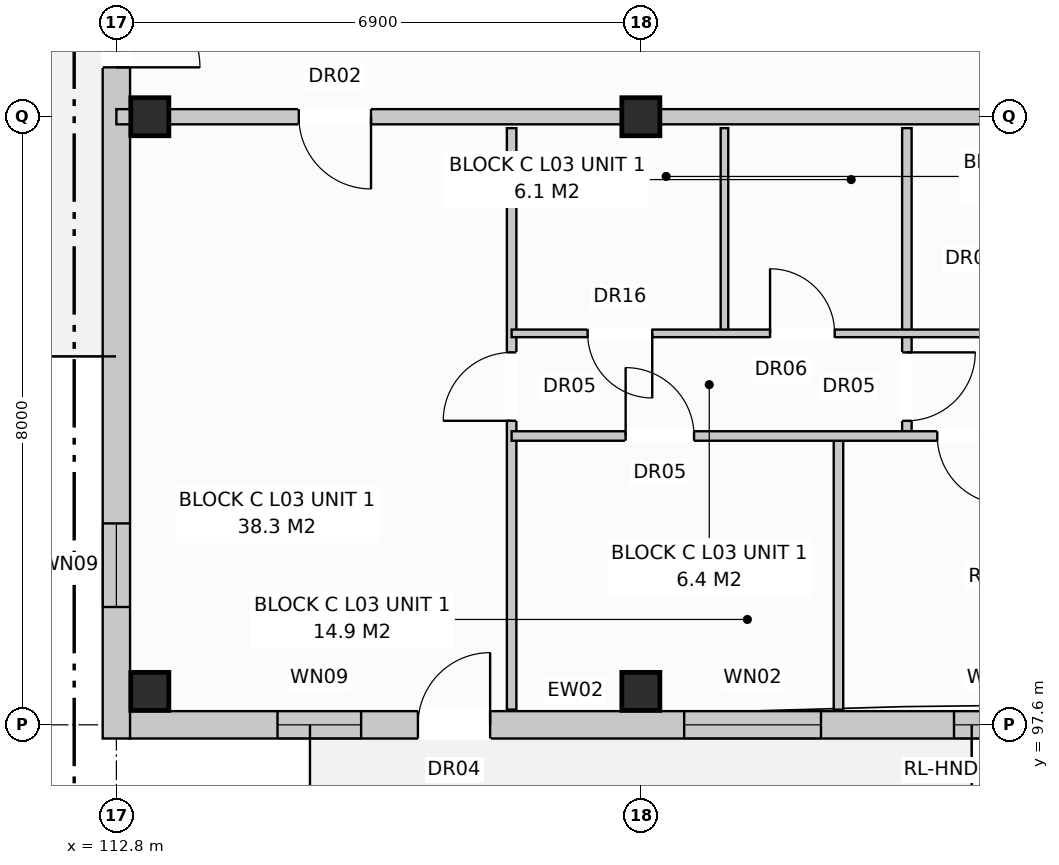
"""IFC4 building model, lengths in metres.
Left out: names, types, materials, properties, quantities, classifications, styles, units other than length and angle.
Written with IfcOpenShell. Run it as: python <this file> out.ifc"""

import sys

from ifc_helpers import new_model, si_unit, direction, frame, frame_2d, origin, origin_with_axes, origin_2d, place, context, subcontext, project, spatial, rectangle, extrude, element, fill, save


model = new_model("IFC4")
c1 = context("Model", 3, precision=1e-05, world=origin(), true_north=direction((0.0, 1.0)))
c2 = subcontext(c1, "Body", "Model", "MODEL_VIEW")
j1 = project(units=[si_unit("LENGTHUNIT", "METRE"), si_unit("PLANEANGLEUNIT", "RADIAN")], contexts=[c1])
p1 = place(None, origin())
s1 = spatial("IfcSite", under=j1, at=p1, CompositionType="ELEMENT")
p2 = place(p1, origin())
s2 = spatial("IfcBuilding", under=s1, at=p2, CompositionType="ELEMENT")
p3 = place(p2, frame((0.0, 0.0, 11.2)))
s3 = spatial("IfcBuildingStorey", under=s2, at=p3, CompositionType="ELEMENT", Elevation=11.2)
for number, where, z_axis, x_axis in (
    (1, (113.24, 98.04, 0.0), (0.0, 0.0, 1.0), (1.0, 0.0, 0.0)),
    (2, (113.24, 105.6, 0.0), (0.0, 0.0, 1.0), (1.0, 0.0, 0.0)),
    (3, (119.7, 98.04, 0.0), (0.0, 0.0, 1.0), (1.0, 0.0, 0.0)),
    (4, (119.7, 105.6, 0.0), (0.0, 0.0, 1.0), (1.0, 0.0, 0.0)),
):
    element("IfcColumn", number, at=place(p3, frame(where, z_axis=z_axis, x_axis=x_axis)), inside=s3, PredefinedType="COLUMN", context=c2, shape_type="SweptSolid", body=[
        extrude(rectangle(XDim=0.5, YDim=0.5, at=origin_2d()), origin(), (0.0, 0.0, 1.0), 3.2),
    ])
p4 = place(p3, frame((112.97, 97.6, 0.0), z_axis=(0.0, 0.0, 1.0), x_axis=(1.0, 0.0, 0.0)))
e5 = element("IfcWall", 5, at=p4, inside=s3, PredefinedType="STANDARD", context=c2, shape_type="SweptSolid", body=[
    extrude(rectangle(XDim=14.08, YDim=0.36, at=frame_2d((7.04, 0.0))), origin(), (0.0, 0.0, 1.0), 2.94),
])
p5 = place(p4, frame((3.797, 0.0, 0.0)))
e6 = element("IfcOpeningElement", 6, at=p5, cuts=e5, PredefinedType="OPENING", context=c2, shape_type="SweptSolid", body=[
    extrude(rectangle(XDim=0.95, YDim=2.1, at=frame_2d((0.475, 1.05))), frame((0.0, 0.192, 0.0), z_axis=(0.0, -1.0, 0.0), x_axis=(1.0, 0.0, 0.0)), (0.0, 0.0, 1.0), 0.384),
])
p6 = place(p4, frame((1.95, 0.0, 0.72)))
e7 = element("IfcOpeningElement", 7, at=p6, cuts=e5, PredefinedType="OPENING", context=c2, shape_type="SweptSolid", body=[
    extrude(rectangle(XDim=1.1, YDim=1.5, at=frame_2d((0.55, 0.75))), frame((0.0, 0.192, 0.0), z_axis=(0.0, -1.0, 0.0), x_axis=(1.0, 0.0, 0.0)), (0.0, 0.0, 1.0), 0.384),
])
p7 = place(p4, frame((7.3, 0.0, 0.8)))
e8 = element("IfcOpeningElement", 8, at=p7, cuts=e5, PredefinedType="OPENING", context=c2, shape_type="SweptSolid", body=[
    extrude(rectangle(XDim=1.8, YDim=1.7, at=frame_2d((0.9, 0.85))), frame((0.0, 0.192, 0.0), z_axis=(0.0, -1.0, 0.0), x_axis=(1.0, 0.0, 0.0)), (0.0, 0.0, 1.0), 0.384),
])
p8 = place(p4, frame((10.85, 0.0, 0.72)))
e9 = element("IfcOpeningElement", 9, at=p8, cuts=e5, PredefinedType="OPENING", context=c2, shape_type="SweptSolid", body=[
    extrude(rectangle(XDim=1.1, YDim=1.5, at=frame_2d((0.55, 0.75))), frame((0.0, 0.192, 0.0), z_axis=(0.0, -1.0, 0.0), x_axis=(1.0, 0.0, 0.0)), (0.0, 0.0, 1.0), 0.384),
])
p9 = place(p3, frame((112.8, 97.42, 0.0), z_axis=(0.0, 0.0, 1.0), x_axis=(0.0, 1.0, 0.0)))
e10 = element("IfcWall", 10, at=p9, inside=s3, PredefinedType="STANDARD", context=c2, shape_type="SweptSolid", body=[
    extrude(rectangle(XDim=18.76, YDim=0.36, at=frame_2d((9.38, 0.0))), origin(), (0.0, 0.0, 1.0), 2.94),
])
p10 = place(p9, frame((8.83, 0.0, 0.0)))
e11 = element("IfcOpeningElement", 11, at=p10, cuts=e10, PredefinedType="OPENING", context=c2, shape_type="SweptSolid", body=[
    extrude(rectangle(XDim=1.1, YDim=2.1, at=frame_2d((0.55, 1.05))), frame((0.0, 0.192, 0.0), z_axis=(0.0, -1.0, 0.0), x_axis=(1.0, 0.0, 0.0)), (0.0, 0.0, 1.0), 0.384),
])
p11 = place(p9, frame((1.73, 0.0, 0.72)))
e12 = element("IfcOpeningElement", 12, at=p11, cuts=e10, PredefinedType="OPENING", context=c2, shape_type="SweptSolid", body=[
    extrude(rectangle(XDim=1.1, YDim=1.5, at=frame_2d((0.55, 0.75))), frame((0.0, 0.192, 0.0), z_axis=(0.0, -1.0, 0.0), x_axis=(1.0, 0.0, 0.0)), (0.0, 0.0, 1.0), 0.384),
])
p12 = place(p9, frame((15.93, 0.0, 0.72)))
e13 = element("IfcOpeningElement", 13, at=p12, cuts=e10, PredefinedType="OPENING", context=c2, shape_type="SweptSolid", body=[
    extrude(rectangle(XDim=1.1, YDim=1.5, at=frame_2d((0.55, 0.75))), frame((0.0, 0.192, 0.0), z_axis=(0.0, -1.0, 0.0), x_axis=(1.0, 0.0, 0.0)), (0.0, 0.0, 1.0), 0.384),
])
p13 = place(p3, frame((112.8, 105.6, 0.0), z_axis=(0.0, 0.0, 1.0), x_axis=(1.0, 0.0, 0.0)))
e14 = element("IfcWall", 14, at=p13, inside=s3, PredefinedType="PARTITIONING", context=c2, shape_type="SweptSolid", body=[
    extrude(rectangle(XDim=13.8, YDim=0.2, at=frame_2d((6.9, 0.0))), origin(), (0.0, 0.0, 1.0), 2.38),
])
p14 = place(p13, frame((2.4, 0.0, 0.0)))
e15 = element("IfcOpeningElement", 15, at=p14, cuts=e14, PredefinedType="OPENING", context=c2, shape_type="SweptSolid", body=[
    extrude(rectangle(XDim=0.95, YDim=2.15, at=frame_2d((0.475, 1.075))), frame((0.0, 0.112, 0.0), z_axis=(0.0, -1.0, 0.0), x_axis=(1.0, 0.0, 0.0)), (0.0, 0.0, 1.0), 0.224),
])
p15 = place(p3, frame((118.0, 105.45, 0.0), z_axis=(0.0, 0.0, 1.0), x_axis=(0.0, -1.0, 0.0)))
e16 = element("IfcWall", 16, at=p15, inside=s3, PredefinedType="PARTITIONING", context=c2, shape_type="SweptSolid", body=[
    extrude(rectangle(XDim=7.65, YDim=0.125, at=frame_2d((3.825, 0.0))), origin(), (0.0, 0.0, 1.0), 2.94),
])
p16 = place(p15, frame((2.95, 0.0, 0.0)))
e17 = element("IfcOpeningElement", 17, at=p16, cuts=e16, PredefinedType="OPENING", context=c2, shape_type="SweptSolid", body=[
    extrude(rectangle(XDim=0.9, YDim=2.1, at=frame_2d((0.45, 1.05))), frame((0.0, 0.074, 0.0), z_axis=(0.0, -1.0, 0.0), x_axis=(1.0, 0.0, 0.0)), (0.0, 0.0, 1.0), 0.149),
])
p17 = place(p3, frame((120.8, 105.45, 0.0), z_axis=(0.0, 0.0, 1.0), x_axis=(0.0, -1.0, 0.0)))
e18 = element("IfcWall", 18, at=p17, inside=s3, PredefinedType="PARTITIONING", context=c2, shape_type="SweptSolid", body=[
    extrude(rectangle(XDim=2.7, YDim=0.1, at=frame_2d((1.35, 0.0))), origin(), (0.0, 0.0, 1.0), 2.94),
])
p18 = place(p3, frame((123.2, 105.45, 0.0), z_axis=(0.0, 0.0, 1.0), x_axis=(0.0, -1.0, 0.0)))
e19 = element("IfcWall", 19, at=p18, inside=s3, PredefinedType="PARTITIONING", context=c2, shape_type="SweptSolid", body=[
    extrude(rectangle(XDim=4.05, YDim=0.125, at=frame_2d((2.025, 0.0))), origin(), (0.0, 0.0, 1.0), 2.59),
])
p19 = place(p18, frame((2.95, 0.0, 0.0)))
e20 = element("IfcOpeningElement", 20, at=p19, cuts=e19, PredefinedType="OPENING", context=c2, shape_type="SweptSolid", body=[
    extrude(rectangle(XDim=0.9, YDim=2.1, at=frame_2d((0.45, 1.05))), frame((0.0, 0.074, 0.0), z_axis=(0.0, -1.0, 0.0), x_axis=(1.0, 0.0, 0.0)), (0.0, 0.0, 1.0), 0.149),
])
p20 = place(p3, frame((122.3, 101.4, 0.0), z_axis=(0.0, 0.0, 1.0), x_axis=(0.0, -1.0, 0.0)))
e21 = element("IfcWall", 21, at=p20, inside=s3, PredefinedType="PARTITIONING", context=c2, shape_type="SweptSolid", body=[
    extrude(rectangle(XDim=3.6, YDim=0.125, at=frame_2d((1.8, 0.0))), origin(), (0.0, 0.0, 1.0), 2.94),
])
p21 = place(p3, frame((118.0, 102.75, 0.0), z_axis=(0.0, 0.0, 1.0), x_axis=(1.0, 0.0, 0.0)))
e22 = element("IfcWall", 22, at=p21, inside=s3, PredefinedType="PARTITIONING", context=c2, shape_type="SweptSolid", body=[
    extrude(rectangle(XDim=8.5, YDim=0.1, at=frame_2d((4.25, 0.0))), origin(), (0.0, 0.0, 1.0), 2.94),
])
p22 = place(p21, frame((1.0, 0.0, 0.0)))
e23 = element("IfcOpeningElement", 23, at=p22, cuts=e22, PredefinedType="OPENING", context=c2, shape_type="SweptSolid", body=[
    extrude(rectangle(XDim=0.85, YDim=2.1, at=frame_2d((0.425, 1.05))), frame((0.0, 0.062, 0.0), z_axis=(0.0, -1.0, 0.0), x_axis=(1.0, 0.0, 0.0)), (0.0, 0.0, 1.0), 0.124),
])
p23 = place(p21, frame((3.4, 0.0, 0.0)))
e24 = element("IfcOpeningElement", 24, at=p23, cuts=e22, PredefinedType="OPENING", context=c2, shape_type="SweptSolid", body=[
    extrude(rectangle(XDim=0.85, YDim=2.05, at=frame_2d((0.425, 1.025))), frame((0.0, 0.062, 0.0), z_axis=(0.0, -1.0, 0.0), x_axis=(1.0, 0.0, 0.0)), (0.0, 0.0, 1.0), 0.124),
])
p24 = place(p21, frame((6.2, 0.0, 0.0)))
e25 = element("IfcOpeningElement", 25, at=p24, cuts=e22, PredefinedType="OPENING", context=c2, shape_type="SweptSolid", body=[
    extrude(rectangle(XDim=0.85, YDim=2.05, at=frame_2d((0.425, 1.025))), frame((0.0, 0.062, 0.0), z_axis=(0.0, -1.0, 0.0), x_axis=(1.0, 0.0, 0.0)), (0.0, 0.0, 1.0), 0.124),
])
p25 = place(p3, frame((118.0, 101.4, 0.0), z_axis=(0.0, 0.0, 1.0), x_axis=(1.0, 0.0, 0.0)))
e26 = element("IfcWall", 26, at=p25, inside=s3, PredefinedType="PARTITIONING", context=c2, shape_type="SweptSolid", body=[
    extrude(rectangle(XDim=8.5, YDim=0.125, at=frame_2d((4.25, 0.0))), origin(), (0.0, 0.0, 1.0), 2.94),
])
p26 = place(p25, frame((1.5, 0.0, 0.0)))
e27 = element("IfcOpeningElement", 27, at=p26, cuts=e26, PredefinedType="OPENING", context=c2, shape_type="SweptSolid", body=[
    extrude(rectangle(XDim=0.9, YDim=2.1, at=frame_2d((0.45, 1.05))), frame((0.0, 0.074, 0.0), z_axis=(0.0, -1.0, 0.0), x_axis=(1.0, 0.0, 0.0)), (0.0, 0.0, 1.0), 0.149),
])
p27 = place(p25, frame((5.6, 0.0, 0.0)))
e28 = element("IfcOpeningElement", 28, at=p27, cuts=e26, PredefinedType="OPENING", context=c2, shape_type="SweptSolid", body=[
    extrude(rectangle(XDim=0.9, YDim=2.1, at=frame_2d((0.45, 1.05))), frame((0.0, 0.074, 0.0), z_axis=(0.0, -1.0, 0.0), x_axis=(1.0, 0.0, 0.0)), (0.0, 0.0, 1.0), 0.149),
])
p28 = place(p5, origin_with_axes())
e29 = element("IfcDoor", 29, at=p28, inside=s3, OperationType="SINGLE_SWING_RIGHT", PredefinedType="DOOR", context=c2, shape_type="SweptSolid", body=[
    extrude(rectangle(XDim=0.95, YDim=2.1, at=frame_2d((0.475, 1.05))), frame((0.0, 0.025, 0.0), z_axis=(0.0, -1.0, 0.0), x_axis=(1.0, 0.0, 0.0)), (0.0, 0.0, 1.0), 0.05),
])
fill(e6, e29)
p29 = place(p6, origin_with_axes())
e30 = element("IfcWindow", 30, at=p29, inside=s3, PartitioningType="SINGLE_PANEL", PredefinedType="WINDOW", context=c2, shape_type="SweptSolid", body=[
    extrude(rectangle(XDim=1.1, YDim=1.5, at=frame_2d((0.55, 0.75))), frame((0.0, 0.03, 0.0), z_axis=(0.0, -1.0, 0.0), x_axis=(1.0, 0.0, 0.0)), (0.0, 0.0, 1.0), 0.06),
])
fill(e7, e30)
p30 = place(p7, origin_with_axes())
e31 = element("IfcWindow", 31, at=p30, inside=s3, PartitioningType="SINGLE_PANEL", PredefinedType="WINDOW", context=c2, shape_type="SweptSolid", body=[
    extrude(rectangle(XDim=1.8, YDim=1.7, at=frame_2d((0.9, 0.85))), frame((0.0, 0.03, 0.0), z_axis=(0.0, -1.0, 0.0), x_axis=(1.0, 0.0, 0.0)), (0.0, 0.0, 1.0), 0.06),
])
fill(e8, e31)
p31 = place(p8, origin_with_axes())
e32 = element("IfcWindow", 32, at=p31, inside=s3, PartitioningType="SINGLE_PANEL", PredefinedType="WINDOW", context=c2, shape_type="SweptSolid", body=[
    extrude(rectangle(XDim=1.1, YDim=1.5, at=frame_2d((0.55, 0.75))), frame((0.0, 0.03, 0.0), z_axis=(0.0, -1.0, 0.0), x_axis=(1.0, 0.0, 0.0)), (0.0, 0.0, 1.0), 0.06),
])
fill(e9, e32)
p32 = place(p10, frame((1.1, 0.0, 0.0), z_axis=(0.0, 0.0, 1.0), x_axis=(-1.0, 0.0, 0.0)))
e33 = element("IfcDoor", 33, at=p32, inside=s3, OperationType="SINGLE_SWING_LEFT", PredefinedType="DOOR", context=c2, shape_type="SweptSolid", body=[
    extrude(rectangle(XDim=1.1, YDim=2.1, at=frame_2d((0.55, 1.05))), frame((0.0, 0.025, 0.0), z_axis=(0.0, -1.0, 0.0), x_axis=(1.0, 0.0, 0.0)), (0.0, 0.0, 1.0), 0.05),
])
fill(e11, e33)
p33 = place(p11, origin_with_axes())
e34 = element("IfcWindow", 34, at=p33, inside=s3, PartitioningType="SINGLE_PANEL", PredefinedType="WINDOW", context=c2, shape_type="SweptSolid", body=[
    extrude(rectangle(XDim=1.1, YDim=1.5, at=frame_2d((0.55, 0.75))), frame((0.0, 0.03, 0.0), z_axis=(0.0, -1.0, 0.0), x_axis=(1.0, 0.0, 0.0)), (0.0, 0.0, 1.0), 0.06),
])
fill(e12, e34)
p34 = place(p14, frame((0.95, 0.0, 0.0), z_axis=(0.0, 0.0, 1.0), x_axis=(-1.0, 0.0, 0.0)))
e35 = element("IfcDoor", 35, at=p34, inside=s3, OperationType="SINGLE_SWING_RIGHT", PredefinedType="DOOR", context=c2, shape_type="SweptSolid", body=[
    extrude(rectangle(XDim=0.95, YDim=2.15, at=frame_2d((0.475, 1.075))), frame((0.0, 0.025, 0.0), z_axis=(0.0, -1.0, 0.0), x_axis=(1.0, 0.0, 0.0)), (0.0, 0.0, 1.0), 0.05),
])
fill(e15, e35)
p35 = place(p16, frame((0.9, 0.0, 0.0), z_axis=(0.0, 0.0, 1.0), x_axis=(-1.0, 0.0, 0.0)))
e36 = element("IfcDoor", 36, at=p35, inside=s3, OperationType="SINGLE_SWING_RIGHT", PredefinedType="DOOR", context=c2, shape_type="SweptSolid", body=[
    extrude(rectangle(XDim=0.9, YDim=2.1, at=frame_2d((0.45, 1.05))), frame((0.0, 0.025, 0.0), z_axis=(0.0, -1.0, 0.0), x_axis=(1.0, 0.0, 0.0)), (0.0, 0.0, 1.0), 0.05),
])
fill(e17, e36)
p36 = place(p19, origin_with_axes())
e37 = element("IfcDoor", 37, at=p36, inside=s3, OperationType="SINGLE_SWING_LEFT", PredefinedType="DOOR", context=c2, shape_type="SweptSolid", body=[
    extrude(rectangle(XDim=0.9, YDim=2.1, at=frame_2d((0.45, 1.05))), frame((0.0, 0.025, 0.0), z_axis=(0.0, -1.0, 0.0), x_axis=(1.0, 0.0, 0.0)), (0.0, 0.0, 1.0), 0.05),
])
fill(e20, e37)
p37 = place(p22, frame((0.85, 0.0, 0.0), z_axis=(0.0, 0.0, 1.0), x_axis=(-1.0, 0.0, 0.0)))
e38 = element("IfcDoor", 38, at=p37, inside=s3, OperationType="SINGLE_SWING_RIGHT", PredefinedType="DOOR", context=c2, shape_type="SweptSolid", body=[
    extrude(rectangle(XDim=0.85, YDim=2.1, at=frame_2d((0.425, 1.05))), frame((0.0, 0.025, 0.0), z_axis=(0.0, -1.0, 0.0), x_axis=(1.0, 0.0, 0.0)), (0.0, 0.0, 1.0), 0.05),
])
fill(e23, e38)
p38 = place(p23, origin_with_axes())
e39 = element("IfcDoor", 39, at=p38, inside=s3, OperationType="SINGLE_SWING_LEFT", PredefinedType="DOOR", context=c2, shape_type="SweptSolid", body=[
    extrude(rectangle(XDim=0.85, YDim=2.05, at=frame_2d((0.425, 1.025))), frame((0.0, 0.025, 0.0), z_axis=(0.0, -1.0, 0.0), x_axis=(1.0, 0.0, 0.0)), (0.0, 0.0, 1.0), 0.05),
])
fill(e24, e39)
p39 = place(p26, origin_with_axes())
e40 = element("IfcDoor", 40, at=p39, inside=s3, OperationType="SINGLE_SWING_LEFT", PredefinedType="DOOR", context=c2, shape_type="SweptSolid", body=[
    extrude(rectangle(XDim=0.9, YDim=2.1, at=frame_2d((0.45, 1.05))), frame((0.0, 0.025, 0.0), z_axis=(0.0, -1.0, 0.0), x_axis=(1.0, 0.0, 0.0)), (0.0, 0.0, 1.0), 0.05),
])
fill(e27, e40)
p40 = place(p27, frame((0.9, 0.0, 0.0), z_axis=(0.0, 0.0, 1.0), x_axis=(-1.0, 0.0, 0.0)))
e41 = element("IfcDoor", 41, at=p40, inside=s3, OperationType="SINGLE_SWING_RIGHT", PredefinedType="DOOR", context=c2, shape_type="SweptSolid", body=[
    extrude(rectangle(XDim=0.9, YDim=2.1, at=frame_2d((0.45, 1.05))), frame((0.0, 0.025, 0.0), z_axis=(0.0, -1.0, 0.0), x_axis=(1.0, 0.0, 0.0)), (0.0, 0.0, 1.0), 0.05),
])
fill(e28, e41)
save(model, sys.argv[1])
